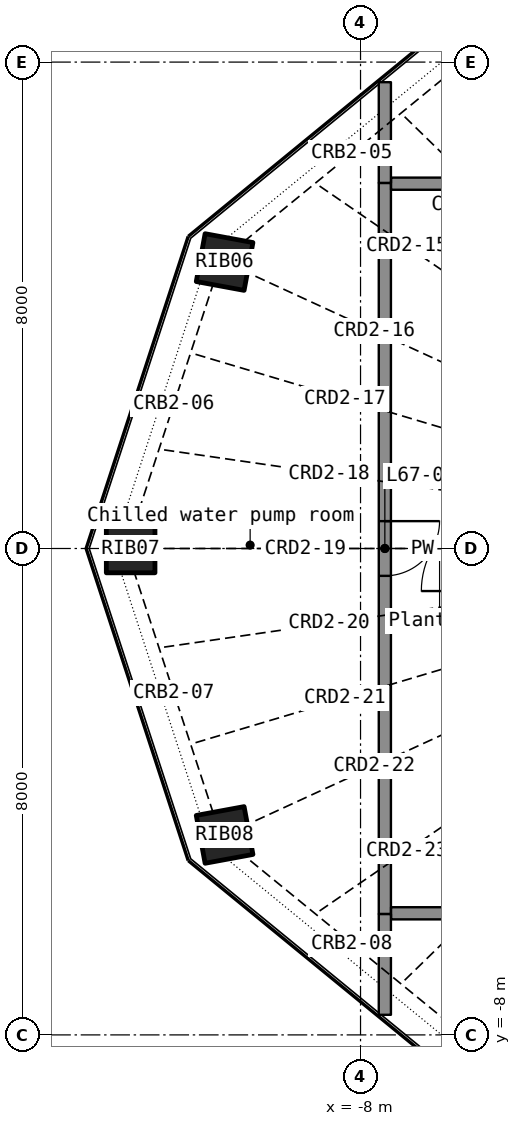
"""IFC4 building model, lengths in metres.
Left out: names, types, materials, properties, quantities, classifications, styles, units other than length and angle.
Written with IfcOpenShell. Run it as: python <this file> out.ifc"""

import sys

from ifc_helpers import new_model, si_unit, direction, frame, frame_2d, origin, origin_2d, place, context, subcontext, project, spatial, rectangle, hollow_rectangle, extrude, element, fill, save


model = new_model("IFC4")
c1 = context("Model", 3, precision=1e-05, world=origin(), true_north=direction((0.0, 1.0)))
c2 = subcontext(c1, "Body", "Model", "MODEL_VIEW")
j1 = project(units=[si_unit("LENGTHUNIT", "METRE"), si_unit("PLANEANGLEUNIT", "RADIAN")], contexts=[c1])
p1 = place(None, origin())
s1 = spatial("IfcSite", under=j1, at=p1, CompositionType="ELEMENT")
p2 = place(p1, origin())
s2 = spatial("IfcBuilding", under=s1, at=p2, CompositionType="ELEMENT")
p3 = place(p2, frame((0.0, 0.0, 276.5)))
s3 = spatial("IfcBuildingStorey", under=s2, at=p3, CompositionType="ELEMENT", Elevation=276.5)
p4 = place(p3, frame((-10.236, 4.711, 0.0), z_axis=(0.11903511, -0.054738773, 0.991380002), x_axis=(0.574404312, 0.818225941, -0.023790672)))
e1 = element("IfcColumn", 1, at=p4, inside=s3, PredefinedType="COLUMN", context=c2, shape_type="SweptSolid", body=[
    extrude(hollow_rectangle(XDim=0.8, YDim=0.8, WallThickness=0.025, at=origin_2d()), origin(), (0.0, 0.0, 1.0), 3.934),
])
p5 = place(p3, frame((-11.781, 0.0, 0.0), z_axis=(0.136922778, 0.0, 0.990581725), x_axis=(0.0, 1.0, 0.0)))
e2 = element("IfcColumn", 2, at=p5, inside=s3, PredefinedType="COLUMN", context=c2, shape_type="SweptSolid", body=[
    extrude(hollow_rectangle(XDim=0.8, YDim=0.8, WallThickness=0.025, at=origin_2d()), origin(), (0.0, 0.0, 1.0), 3.937),
])
p6 = place(p3, frame((-10.236, -4.711, 0.0), z_axis=(0.11903511, 0.054738773, 0.991380002), x_axis=(-0.574404312, 0.818225941, 0.023790672)))
e3 = element("IfcColumn", 3, at=p6, inside=s3, PredefinedType="COLUMN", context=c2, shape_type="SweptSolid", body=[
    extrude(hollow_rectangle(XDim=0.8, YDim=0.8, WallThickness=0.025, at=origin_2d()), origin(), (0.0, 0.0, 1.0), 3.934),
])
p7 = place(p3, frame((-7.6, 6.012, 0.0), z_axis=(0.0, 0.0, 1.0), x_axis=(0.0, -1.0, 0.0)))
e4 = element("IfcWall", 4, at=p7, inside=s3, PredefinedType="PARTITIONING", context=c2, shape_type="SweptSolid", body=[
    extrude(rectangle(XDim=12.024, YDim=0.2, at=frame_2d((6.012, 0.0))), origin(), (0.0, 0.0, 1.0), 2.9),
])
p8 = place(p7, frame((5.562, 0.0, 0.0)))
e5 = element("IfcOpeningElement", 5, at=p8, cuts=e4, PredefinedType="OPENING", context=c2, shape_type="SweptSolid", body=[
    extrude(rectangle(XDim=0.9, YDim=2.1, at=frame_2d((0.45, 1.05))), frame((0.0, 0.11, 0.0), z_axis=(0.0, -1.0, 0.0), x_axis=(1.0, 0.0, 0.0)), (0.0, 0.0, 1.0), 0.22),
])
for number, where, z_axis, x_axis in (
    (6, (-7.498, -6.0, 0.0), (0.0, 0.0, 1.0), (1.0, 0.0, 0.0)),
    (7, (-5.813, 6.0, 0.0), (0.0, 0.0, 1.0), (-1.0, 0.0, 0.0)),
):
    element("IfcWall", number, at=place(p3, frame(where, z_axis=z_axis, x_axis=x_axis)), inside=s3, PredefinedType="PARTITIONING", context=c2, shape_type="SweptSolid", body=[
        extrude(rectangle(XDim=1.685, YDim=0.2, at=frame_2d((0.843, 0.0))), origin(), (0.0, 0.0, 1.0), 2.9),
    ])
for number, where, z_axis, x_axis in (
    (8, (-7.6, -7.669, 0.0), (0.0, 0.0, 1.0), (0.0, 1.0, 0.0)),
    (9, (-7.6, 6.013, 0.0), (0.0, 0.0, 1.0), (0.0, 1.0, 0.0)),
):
    element("IfcWall", number, at=place(p3, frame(where, z_axis=z_axis, x_axis=x_axis)), inside=s3, PredefinedType="PARTITIONING", context=c2, shape_type="SweptSolid", body=[
        extrude(rectangle(XDim=1.656, YDim=0.2, at=frame_2d((0.828, 0.0))), origin(), (0.0, 0.0, 1.0), 2.9),
    ])
p9 = place(p8, origin())
e10 = element("IfcDoor", 10, at=p9, inside=s3, OperationType="SINGLE_SWING_LEFT", PredefinedType="DOOR", context=c2, shape_type="SweptSolid", body=[
    extrude(rectangle(XDim=0.9, YDim=2.1, at=frame_2d((0.45, 1.05))), frame((0.0, 0.025, 0.0), z_axis=(0.0, -1.0, 0.0), x_axis=(1.0, 0.0, 0.0)), (0.0, 0.0, 1.0), 0.05),
])
fill(e5, e10)
save(model, sys.argv[1])
